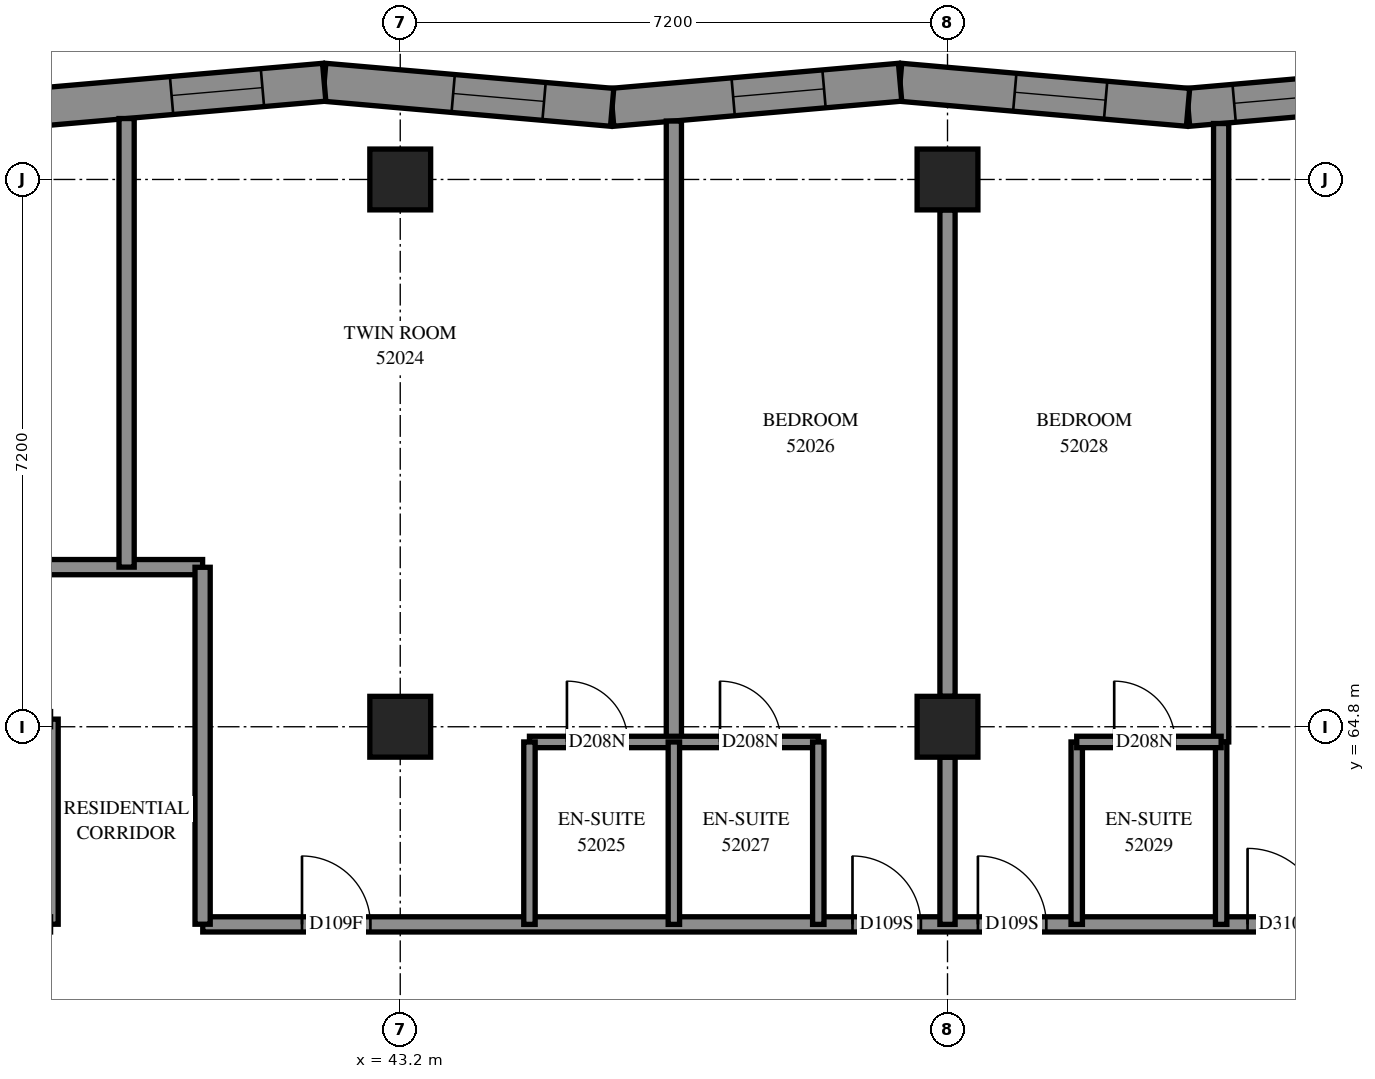
"""IFC4 building model, lengths in metres.
Left out: names, types, materials, properties, quantities, classifications, styles, units other than length and angle.
Written with IfcOpenShell. Run it as: python <this file> out.ifc"""

import sys

from ifc_helpers import new_model, si_unit, direction, frame, frame_2d, origin, origin_2d, place, context, subcontext, project, spatial, polyline, rectangle, outline, extrude, element, fill, save


model = new_model("IFC4")
c1 = context("Model", 3, precision=1e-05, world=origin(), true_north=direction((0.0, 1.0)))
c2 = subcontext(c1, "Body", "Model", "MODEL_VIEW")
j1 = project(units=[si_unit("LENGTHUNIT", "METRE"), si_unit("PLANEANGLEUNIT", "RADIAN")], contexts=[c1])
p1 = place(None, origin())
s1 = spatial("IfcSite", under=j1, at=p1, CompositionType="ELEMENT")
p2 = place(p1, origin())
s2 = spatial("IfcBuilding", under=s1, at=p2, CompositionType="ELEMENT")
p3 = place(p2, frame((0.0, 0.0, 193.0)))
s3 = spatial("IfcBuildingStorey", under=s2, at=p3, CompositionType="ELEMENT", Elevation=193.0)
for number, where, z_axis, x_axis in (
    (1, (43.2, 64.8, 0.0), (0.0, 0.0, 1.0), (1.0, 0.0, 0.0)),
    (2, (43.2, 72.0, 0.0), (0.0, 0.0, 1.0), (1.0, 0.0, 0.0)),
    (3, (50.4, 64.8, 0.0), (0.0, 0.0, 1.0), (1.0, 0.0, 0.0)),
    (4, (50.4, 72.0, 0.0), (0.0, 0.0, 1.0), (1.0, 0.0, 0.0)),
):
    element("IfcColumn", number, at=place(p3, frame(where, z_axis=z_axis, x_axis=x_axis)), inside=s3, PredefinedType="COLUMN", context=c2, shape_type="SweptSolid", body=[
        extrude(rectangle(XDim=0.8, YDim=0.8, at=origin_2d()), origin(), (0.0, 0.0, 1.0), 3.1),
    ])
p4 = place(p3, frame((57.353, 73.279, 0.0), z_axis=(0.0, 0.0, 1.0), x_axis=(-0.9962273538, -0.0867816769, 0.0)))
e5 = element("IfcWall", 5, at=p4, inside=s3, PredefinedType="SOLIDWALL", context=c2, shape_type="SweptSolid", body=[
    extrude(outline(polyline([(-0.022, -0.25), (3.781, -0.25), (3.824, 0.25), (0.022, 0.25), (-0.022, -0.25)])), origin(), (0.0, 0.0, 1.0), 3.1),
])
p5 = place(p4, frame((0.394, 0.0, 0.45)))
e6 = element("IfcOpeningElement", 6, at=p5, cuts=e5, PredefinedType="OPENING", context=c2, shape_type="SweptSolid", body=[
    extrude(rectangle(XDim=1.3, YDim=2.5, at=frame_2d((0.65, 1.25))), frame((0.0, 0.26, 0.0), z_axis=(0.0, -1.0, 0.0), x_axis=(1.0, 0.0, 0.0)), (0.0, 0.0, 1.0), 0.52),
])
p6 = place(p4, frame((1.894, 0.0, 0.45)))
e7 = element("IfcOpeningElement", 7, at=p6, cuts=e5, PredefinedType="OPENING", context=c2, shape_type="SweptSolid", body=[
    extrude(rectangle(XDim=1.3, YDim=2.5, at=frame_2d((0.65, 1.25))), frame((0.0, 0.26, 0.0), z_axis=(0.0, -1.0, 0.0), x_axis=(1.0, 0.0, 0.0)), (0.0, 0.0, 1.0), 0.52),
])
p7 = place(p3, frame((53.564, 72.949, 0.0), z_axis=(0.0, 0.0, 1.0), x_axis=(-0.9962271558, 0.0867839505, 0.0)))
e8 = element("IfcWall", 8, at=p7, inside=s3, PredefinedType="SOLIDWALL", context=c2, shape_type="SweptSolid", body=[
    extrude(outline(polyline([(0.022, -0.25), (3.824, -0.25), (3.781, 0.25), (-0.022, 0.25), (0.022, -0.25)])), origin(), (0.0, 0.0, 1.0), 3.1),
])
p8 = place(p7, frame((1.088, 0.0, 0.45)))
e9 = element("IfcOpeningElement", 9, at=p8, cuts=e8, PredefinedType="OPENING", context=c2, shape_type="SweptSolid", body=[
    extrude(rectangle(XDim=1.2, YDim=2.5, at=frame_2d((0.6, 1.25))), frame((0.0, 0.26, 0.0), z_axis=(0.0, -1.0, 0.0), x_axis=(1.0, 0.0, 0.0)), (0.0, 0.0, 1.0), 0.52),
])
p9 = place(p3, frame((49.776, 73.279, 0.0), z_axis=(0.0, 0.0, 1.0), x_axis=(-0.9962273538, -0.0867816769, 0.0)))
e10 = element("IfcWall", 10, at=p9, inside=s3, PredefinedType="SOLIDWALL", context=c2, shape_type="SweptSolid", body=[
    extrude(outline(polyline([(-0.022, -0.25), (3.781, -0.25), (3.824, 0.25), (0.022, 0.25), (-0.022, -0.25)])), origin(), (0.0, 0.0, 1.0), 3.1),
])
p10 = place(p9, frame((1.005, 0.0, 0.45)))
e11 = element("IfcOpeningElement", 11, at=p10, cuts=e10, PredefinedType="OPENING", context=c2, shape_type="SweptSolid", body=[
    extrude(rectangle(XDim=1.2, YDim=2.5, at=frame_2d((0.6, 1.25))), frame((0.0, 0.26, 0.0), z_axis=(0.0, -1.0, 0.0), x_axis=(1.0, 0.0, 0.0)), (0.0, 0.0, 1.0), 0.52),
])
p11 = place(p3, frame((45.988, 72.949, 0.0), z_axis=(0.0, 0.0, 1.0), x_axis=(-0.9962273538, 0.0867816769, 0.0)))
e12 = element("IfcWall", 12, at=p11, inside=s3, PredefinedType="SOLIDWALL", context=c2, shape_type="SweptSolid", body=[
    extrude(outline(polyline([(0.022, -0.25), (3.824, -0.25), (3.781, 0.25), (-0.022, 0.25), (0.022, -0.25)])), origin(), (0.0, 0.0, 1.0), 3.1),
])
p12 = place(p11, frame((0.899, 0.0, 0.45)))
e13 = element("IfcOpeningElement", 13, at=p12, cuts=e12, PredefinedType="OPENING", context=c2, shape_type="SweptSolid", body=[
    extrude(rectangle(XDim=1.2, YDim=2.5, at=frame_2d((0.6, 1.25))), frame((0.0, 0.26, 0.0), z_axis=(0.0, -1.0, 0.0), x_axis=(1.0, 0.0, 0.0)), (0.0, 0.0, 1.0), 0.52),
])
p13 = place(p3, frame((42.2, 73.279, 0.0), z_axis=(0.0, 0.0, 1.0), x_axis=(-0.9962273538, -0.0867816769, 0.0)))
e14 = element("IfcWall", 14, at=p13, inside=s3, PredefinedType="SOLIDWALL", context=c2, shape_type="SweptSolid", body=[
    extrude(outline(polyline([(-0.022, -0.25), (3.781, -0.25), (3.824, 0.25), (0.022, 0.25), (-0.022, -0.25)])), origin(), (0.0, 0.0, 1.0), 3.1),
])
p14 = place(p13, frame((0.816, 0.0, 0.45)))
e15 = element("IfcOpeningElement", 15, at=p14, cuts=e14, PredefinedType="OPENING", context=c2, shape_type="SweptSolid", body=[
    extrude(rectangle(XDim=1.2, YDim=2.5, at=frame_2d((0.6, 1.25))), frame((0.0, 0.26, 0.0), z_axis=(0.0, -1.0, 0.0), x_axis=(1.0, 0.0, 0.0)), (0.0, 0.0, 1.0), 0.52),
])
p15 = place(p3, frame((21.602, 66.9, 0.0), z_axis=(0.0, 0.0, 1.0), x_axis=(1.0, 0.0, 0.0)))
e16 = element("IfcWall", 16, at=p15, inside=s3, PredefinedType="PARTITIONING", context=c2, shape_type="SweptSolid", body=[
    extrude(rectangle(XDim=18.998, YDim=0.2, at=frame_2d((9.499, 0.0))), origin(), (0.0, 0.0, 1.0), 3.1),
])
p16 = place(p15, frame((5.972, 0.0, 0.0)))
e17 = element("IfcOpeningElement", 17, at=p16, cuts=e16, PredefinedType="OPENING", context=c2, shape_type="SweptSolid", body=[
    extrude(rectangle(XDim=1.0, YDim=2.1, at=frame_2d((0.5, 1.05))), frame((0.0, 0.11, 0.0), z_axis=(0.0, -1.0, 0.0), x_axis=(1.0, 0.0, 0.0)), (0.0, 0.0, 1.0), 0.22),
])
p17 = place(p15, frame((13.172, 0.0, 0.0)))
e18 = element("IfcOpeningElement", 18, at=p17, cuts=e16, PredefinedType="OPENING", context=c2, shape_type="SweptSolid", body=[
    extrude(rectangle(XDim=1.0, YDim=2.1, at=frame_2d((0.5, 1.05))), frame((0.0, 0.11, 0.0), z_axis=(0.0, -1.0, 0.0), x_axis=(1.0, 0.0, 0.0)), (0.0, 0.0, 1.0), 0.22),
])
p18 = place(p3, frame((40.602, 62.2, 0.0), z_axis=(0.0, 0.0, 1.0), x_axis=(1.0, 0.0, 0.0)))
e19 = element("IfcWall", 19, at=p18, inside=s3, PredefinedType="PARTITIONING", context=c2, shape_type="SweptSolid", body=[
    extrude(rectangle(XDim=14.998, YDim=0.2, at=frame_2d((7.499, 0.0))), origin(), (0.0, 0.0, 1.0), 3.1),
])
p19 = place(p18, frame((1.306, 0.0, 0.0)))
e20 = element("IfcOpeningElement", 20, at=p19, cuts=e19, PredefinedType="OPENING", context=c2, shape_type="SweptSolid", body=[
    extrude(rectangle(XDim=0.9, YDim=2.1, at=frame_2d((0.45, 1.05))), frame((0.0, 0.11, 0.0), z_axis=(0.0, -1.0, 0.0), x_axis=(1.0, 0.0, 0.0)), (0.0, 0.0, 1.0), 0.22),
])
p20 = place(p18, frame((8.548, 0.0, 0.0)))
e21 = element("IfcOpeningElement", 21, at=p20, cuts=e19, PredefinedType="OPENING", context=c2, shape_type="SweptSolid", body=[
    extrude(rectangle(XDim=0.9, YDim=2.1, at=frame_2d((0.45, 1.05))), frame((0.0, 0.11, 0.0), z_axis=(0.0, -1.0, 0.0), x_axis=(1.0, 0.0, 0.0)), (0.0, 0.0, 1.0), 0.22),
])
p21 = place(p18, frame((10.198, 0.0, 0.0)))
e22 = element("IfcOpeningElement", 22, at=p21, cuts=e19, PredefinedType="OPENING", context=c2, shape_type="SweptSolid", body=[
    extrude(rectangle(XDim=0.9, YDim=2.1, at=frame_2d((0.45, 1.05))), frame((0.0, 0.11, 0.0), z_axis=(0.0, -1.0, 0.0), x_axis=(1.0, 0.0, 0.0)), (0.0, 0.0, 1.0), 0.22),
])
p22 = place(p18, frame((13.746, 0.0, 0.0)))
e23 = element("IfcOpeningElement", 23, at=p22, cuts=e19, PredefinedType="OPENING", context=c2, shape_type="SweptSolid", body=[
    extrude(rectangle(XDim=1.0, YDim=2.1, at=frame_2d((0.5, 1.05))), frame((0.0, 0.11, 0.0), z_axis=(0.0, -1.0, 0.0), x_axis=(1.0, 0.0, 0.0)), (0.0, 0.0, 1.0), 0.22),
])
p23 = place(p3, frame((46.8, 64.6, 0.0), z_axis=(0.0, 0.0, 1.0), x_axis=(0.0, 1.0, 0.0)))
e24 = element("IfcWall", 24, at=p23, inside=s3, PredefinedType="PARTITIONING", context=c2, shape_type="SweptSolid", body=[
    extrude(rectangle(XDim=8.169, YDim=0.2, at=frame_2d((4.085, 0.0))), origin(), (0.0, 0.0, 1.0), 3.1),
])
p24 = place(p3, frame((54.0, 64.6, 0.0), z_axis=(0.0, 0.0, 1.0), x_axis=(0.0, 1.0, 0.0)))
e25 = element("IfcWall", 25, at=p24, inside=s3, PredefinedType="PARTITIONING", context=c2, shape_type="SweptSolid", body=[
    extrude(rectangle(XDim=8.136, YDim=0.2, at=frame_2d((4.068, 0.0))), origin(), (0.0, 0.0, 1.0), 3.1),
])
p25 = place(p3, frame((50.4, 65.2, 0.0), z_axis=(0.0, 0.0, 1.0), x_axis=(0.0, 1.0, 0.0)))
e26 = element("IfcWall", 26, at=p25, inside=s3, PredefinedType="PARTITIONING", context=c2, shape_type="SweptSolid", body=[
    extrude(rectangle(XDim=6.4, YDim=0.2, at=frame_2d((3.2, 0.0))), origin(), (0.0, 0.0, 1.0), 3.1),
])
p26 = place(p3, frame((39.6, 66.9, 0.0), z_axis=(0.0, 0.0, 1.0), x_axis=(0.0, 1.0, 0.0)))
e27 = element("IfcWall", 27, at=p26, inside=s3, PredefinedType="PARTITIONING", context=c2, shape_type="SweptSolid", body=[
    extrude(rectangle(XDim=5.902, YDim=0.2, at=frame_2d((2.951, 0.0))), origin(), (0.0, 0.0, 1.0), 3.1),
])
p27 = place(p3, frame((40.6, 62.202, 0.0), z_axis=(0.0, 0.0, 1.0), x_axis=(0.0, 1.0, 0.0)))
e28 = element("IfcWall", 28, at=p27, inside=s3, PredefinedType="PARTITIONING", context=c2, shape_type="SweptSolid", body=[
    extrude(rectangle(XDim=4.696, YDim=0.2, at=frame_2d((2.348, 0.0))), origin(), (0.0, 0.0, 1.0), 3.1),
])
p28 = place(p3, frame((44.9, 64.6, 0.0), z_axis=(0.0, 0.0, 1.0), x_axis=(1.0, 0.0, 0.0)))
e29 = element("IfcWall", 29, at=p28, inside=s3, PredefinedType="PARTITIONING", context=c2, shape_type="SweptSolid", body=[
    extrude(rectangle(XDim=3.8, YDim=0.15, at=frame_2d((1.9, 0.0))), origin(), (0.0, 0.0, 1.0), 3.1),
])
p29 = place(p28, frame((0.493, 0.0, 0.0)))
e30 = element("IfcOpeningElement", 30, at=p29, cuts=e29, PredefinedType="OPENING", context=c2, shape_type="SweptSolid", body=[
    extrude(rectangle(XDim=0.8, YDim=2.1, at=frame_2d((0.4, 1.05))), frame((0.0, 0.085, 0.0), z_axis=(0.0, -1.0, 0.0), x_axis=(1.0, 0.0, 0.0)), (0.0, 0.0, 1.0), 0.17),
])
p30 = place(p28, frame((2.507, 0.0, 0.0)))
e31 = element("IfcOpeningElement", 31, at=p30, cuts=e29, PredefinedType="OPENING", context=c2, shape_type="SweptSolid", body=[
    extrude(rectangle(XDim=0.8, YDim=2.1, at=frame_2d((0.4, 1.05))), frame((0.0, 0.085, 0.0), z_axis=(0.0, -1.0, 0.0), x_axis=(1.0, 0.0, 0.0)), (0.0, 0.0, 1.0), 0.17),
])
p31 = place(p3, frame((38.6, 62.202, 0.0), z_axis=(0.0, 0.0, 1.0), x_axis=(0.0, 1.0, 0.0)))
e32 = element("IfcWall", 32, at=p31, inside=s3, PredefinedType="PARTITIONING", context=c2, shape_type="SweptSolid", body=[
    extrude(rectangle(XDim=2.698, YDim=0.2, at=frame_2d((1.349, 0.0))), origin(), (0.0, 0.0, 1.0), 3.1),
])
for number, where, z_axis, x_axis in (
    (33, (44.9, 62.2, 0.0), (0.0, 0.0, 1.0), (0.0, 1.0, 0.0)),
    (34, (46.8, 62.2, 0.0), (0.0, 0.0, 1.0), (0.0, 1.0, 0.0)),
    (35, (48.7, 62.2, 0.0), (0.0, 0.0, 1.0), (0.0, 1.0, 0.0)),
    (36, (52.1, 62.2, 0.0), (0.0, 0.0, 1.0), (0.0, 1.0, 0.0)),
    (37, (54.0, 62.2, 0.0), (0.0, 0.0, 1.0), (0.0, 1.0, 0.0)),
):
    element("IfcWall", number, at=place(p3, frame(where, z_axis=z_axis, x_axis=x_axis)), inside=s3, PredefinedType="PARTITIONING", context=c2, shape_type="SweptSolid", body=[
        extrude(rectangle(XDim=2.4, YDim=0.15, at=frame_2d((1.2, 0.0))), origin(), (0.0, 0.0, 1.0), 3.1),
    ])
p32 = place(p3, frame((50.4, 62.2, 0.0), z_axis=(0.0, 0.0, 1.0), x_axis=(0.0, 1.0, 0.0)))
e38 = element("IfcWall", 38, at=p32, inside=s3, PredefinedType="PARTITIONING", context=c2, shape_type="SweptSolid", body=[
    extrude(rectangle(XDim=2.2, YDim=0.2, at=frame_2d((1.1, 0.0))), origin(), (0.0, 0.0, 1.0), 3.1),
])
p33 = place(p3, frame((52.1, 64.6, 0.0), z_axis=(0.0, 0.0, 1.0), x_axis=(1.0, 0.0, 0.0)))
e39 = element("IfcWall", 39, at=p33, inside=s3, PredefinedType="PARTITIONING", context=c2, shape_type="SweptSolid", body=[
    extrude(rectangle(XDim=1.9, YDim=0.15, at=frame_2d((0.95, 0.0))), origin(), (0.0, 0.0, 1.0), 3.1),
])
p34 = place(p33, frame((0.493, 0.0, 0.0)))
e40 = element("IfcOpeningElement", 40, at=p34, cuts=e39, PredefinedType="OPENING", context=c2, shape_type="SweptSolid", body=[
    extrude(rectangle(XDim=0.8, YDim=2.1, at=frame_2d((0.4, 1.05))), frame((0.0, 0.085, 0.0), z_axis=(0.0, -1.0, 0.0), x_axis=(1.0, 0.0, 0.0)), (0.0, 0.0, 1.0), 0.17),
])
p35 = place(p6, origin())
e41 = element("IfcWindow", 41, at=p35, inside=s3, PartitioningType="SINGLE_PANEL", PredefinedType="WINDOW", context=c2, shape_type="SweptSolid", body=[
    extrude(rectangle(XDim=1.3, YDim=2.5, at=frame_2d((0.65, 1.25))), frame((0.0, 0.18, 0.0), z_axis=(0.0, -1.0, 0.0), x_axis=(1.0, 0.0, 0.0)), (0.0, 0.0, 1.0), 0.06),
])
fill(e7, e41)
p36 = place(p8, origin())
e42 = element("IfcWindow", 42, at=p36, inside=s3, PartitioningType="SINGLE_PANEL", PredefinedType="WINDOW", context=c2, shape_type="SweptSolid", body=[
    extrude(rectangle(XDim=1.2, YDim=2.5, at=frame_2d((0.6, 1.25))), frame((0.0, 0.18, 0.0), z_axis=(0.0, -1.0, 0.0), x_axis=(1.0, 0.0, 0.0)), (0.0, 0.0, 1.0), 0.06),
])
fill(e9, e42)
p37 = place(p10, origin())
e43 = element("IfcWindow", 43, at=p37, inside=s3, PartitioningType="SINGLE_PANEL", PredefinedType="WINDOW", context=c2, shape_type="SweptSolid", body=[
    extrude(rectangle(XDim=1.2, YDim=2.5, at=frame_2d((0.6, 1.25))), frame((0.0, 0.18, 0.0), z_axis=(0.0, -1.0, 0.0), x_axis=(1.0, 0.0, 0.0)), (0.0, 0.0, 1.0), 0.06),
])
fill(e11, e43)
p38 = place(p12, origin())
e44 = element("IfcWindow", 44, at=p38, inside=s3, PartitioningType="SINGLE_PANEL", PredefinedType="WINDOW", context=c2, shape_type="SweptSolid", body=[
    extrude(rectangle(XDim=1.2, YDim=2.5, at=frame_2d((0.6, 1.25))), frame((0.0, 0.18, 0.0), z_axis=(0.0, -1.0, 0.0), x_axis=(1.0, 0.0, 0.0)), (0.0, 0.0, 1.0), 0.06),
])
fill(e13, e44)
p39 = place(p14, origin())
e45 = element("IfcWindow", 45, at=p39, inside=s3, PartitioningType="SINGLE_PANEL", PredefinedType="WINDOW", context=c2, shape_type="SweptSolid", body=[
    extrude(rectangle(XDim=1.2, YDim=2.5, at=frame_2d((0.6, 1.25))), frame((0.0, 0.18, 0.0), z_axis=(0.0, -1.0, 0.0), x_axis=(1.0, 0.0, 0.0)), (0.0, 0.0, 1.0), 0.06),
])
fill(e15, e45)
p40 = place(p19, origin())
e46 = element("IfcDoor", 46, at=p40, inside=s3, OperationType="SINGLE_SWING_LEFT", PredefinedType="DOOR", context=c2, shape_type="SweptSolid", body=[
    extrude(rectangle(XDim=0.9, YDim=2.1, at=frame_2d((0.45, 1.05))), frame((0.0, 0.025, 0.0), z_axis=(0.0, -1.0, 0.0), x_axis=(1.0, 0.0, 0.0)), (0.0, 0.0, 1.0), 0.05),
])
fill(e20, e46)
p41 = place(p29, origin())
e47 = element("IfcDoor", 47, at=p41, inside=s3, OperationType="SINGLE_SWING_RIGHT", PredefinedType="DOOR", context=c2, shape_type="SweptSolid", body=[
    extrude(rectangle(XDim=0.8, YDim=2.1, at=frame_2d((0.4, 1.05))), frame((0.0, 0.025, 0.0), z_axis=(0.0, -1.0, 0.0), x_axis=(1.0, 0.0, 0.0)), (0.0, 0.0, 1.0), 0.05),
])
fill(e30, e47)
p42 = place(p20, origin())
e48 = element("IfcDoor", 48, at=p42, inside=s3, OperationType="SINGLE_SWING_LEFT", PredefinedType="DOOR", context=c2, shape_type="SweptSolid", body=[
    extrude(rectangle(XDim=0.9, YDim=2.1, at=frame_2d((0.45, 1.05))), frame((0.0, 0.025, 0.0), z_axis=(0.0, -1.0, 0.0), x_axis=(1.0, 0.0, 0.0)), (0.0, 0.0, 1.0), 0.05),
])
fill(e21, e48)
p43 = place(p30, origin())
e49 = element("IfcDoor", 49, at=p43, inside=s3, OperationType="SINGLE_SWING_RIGHT", PredefinedType="DOOR", context=c2, shape_type="SweptSolid", body=[
    extrude(rectangle(XDim=0.8, YDim=2.1, at=frame_2d((0.4, 1.05))), frame((0.0, 0.025, 0.0), z_axis=(0.0, -1.0, 0.0), x_axis=(1.0, 0.0, 0.0)), (0.0, 0.0, 1.0), 0.05),
])
fill(e31, e49)
p44 = place(p21, origin())
e50 = element("IfcDoor", 50, at=p44, inside=s3, OperationType="SINGLE_SWING_RIGHT", PredefinedType="DOOR", context=c2, shape_type="SweptSolid", body=[
    extrude(rectangle(XDim=0.9, YDim=2.1, at=frame_2d((0.45, 1.05))), frame((0.0, 0.025, 0.0), z_axis=(0.0, -1.0, 0.0), x_axis=(1.0, 0.0, 0.0)), (0.0, 0.0, 1.0), 0.05),
])
fill(e22, e50)
p45 = place(p34, origin())
e51 = element("IfcDoor", 51, at=p45, inside=s3, OperationType="SINGLE_SWING_RIGHT", PredefinedType="DOOR", context=c2, shape_type="SweptSolid", body=[
    extrude(rectangle(XDim=0.8, YDim=2.1, at=frame_2d((0.4, 1.05))), frame((0.0, 0.025, 0.0), z_axis=(0.0, -1.0, 0.0), x_axis=(1.0, 0.0, 0.0)), (0.0, 0.0, 1.0), 0.05),
])
fill(e40, e51)
p46 = place(p22, origin())
e52 = element("IfcDoor", 52, at=p46, inside=s3, OperationType="SINGLE_SWING_LEFT", PredefinedType="DOOR", context=c2, shape_type="SweptSolid", body=[
    extrude(rectangle(XDim=1.0, YDim=2.1, at=frame_2d((0.5, 1.05))), frame((0.0, 0.025, 0.0), z_axis=(0.0, -1.0, 0.0), x_axis=(1.0, 0.0, 0.0)), (0.0, 0.0, 1.0), 0.05),
])
fill(e23, e52)
save(model, sys.argv[1])
